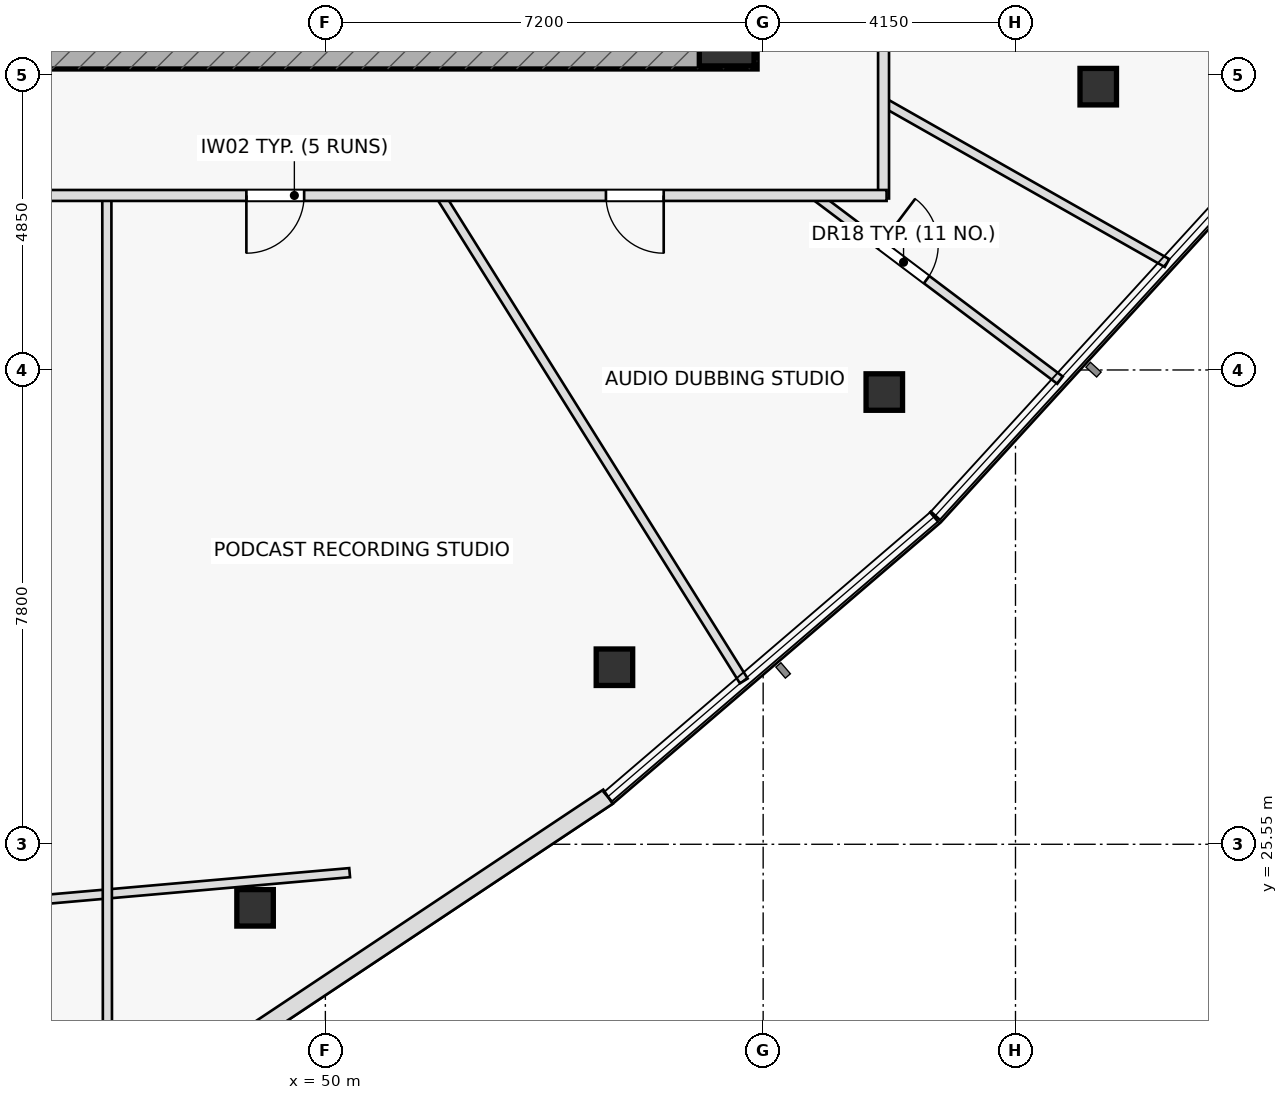
"""IFC4 building model, lengths in metres.
Left out: names, types, materials, properties, quantities, classifications, styles, units other than length and angle.
Written with IfcOpenShell. Run it as: python <this file> out.ifc"""

import sys

from ifc_helpers import new_model, si_unit, direction, frame, frame_2d, origin, origin_2d, place, context, subcontext, project, spatial, rectangle, hollow_rectangle, extrude, element, fill, save


model = new_model("IFC4")
c1 = context("Model", 3, precision=1e-05, world=origin(), true_north=direction((0.0, 1.0)))
c2 = subcontext(c1, "Body", "Model", "MODEL_VIEW")
j1 = project(units=[si_unit("LENGTHUNIT", "METRE"), si_unit("PLANEANGLEUNIT", "RADIAN")], contexts=[c1])
p1 = place(None, origin())
s1 = spatial("IfcSite", under=j1, at=p1, CompositionType="ELEMENT")
p2 = place(p1, origin())
s2 = spatial("IfcBuilding", under=s1, at=p2, CompositionType="ELEMENT")
p3 = place(p2, frame((0.0, 0.0, 226.1)))
s3 = spatial("IfcBuildingStorey", under=s2, at=p3, CompositionType="ELEMENT", Elevation=226.1)
p4 = place(p3, frame((42.9, 38.55, 0.0), z_axis=(0.0, 0.0, 1.0), x_axis=(1.0, 0.0, 0.0)))
e1 = element("IfcWall", 1, at=p4, inside=s3, PredefinedType="SHEAR", context=c2, shape_type="SweptSolid", body=[
    extrude(rectangle(XDim=14.2, YDim=0.5, at=frame_2d((7.1, 0.0))), origin(), (0.0, 0.0, 1.0), 3.65),
])
p5 = place(p4, frame((0.78, 0.0, 0.0)))
e2 = element("IfcOpeningElement", 2, at=p5, cuts=e1, PredefinedType="OPENING", context=c2, shape_type="SweptSolid", body=[
    extrude(rectangle(XDim=1.05, YDim=2.2, at=frame_2d((0.525, 1.1))), frame((0.0, 0.26, 0.0), z_axis=(0.0, -1.0, 0.0), x_axis=(1.0, 0.0, 0.0)), (0.0, 0.0, 1.0), 0.52),
])
p6 = place(p3, frame((56.6, 38.8, 0.0), z_axis=(0.0, 0.0, 1.0), x_axis=(1.0, 0.0, 0.0)))
e3 = element("IfcColumn", 3, at=p6, inside=s3, PredefinedType="COLUMN", context=c2, shape_type="SweptSolid", body=[
    extrude(rectangle(XDim=0.9, YDim=0.9, at=origin_2d()), origin(), (0.0, 0.0, 1.0), 3.65),
])
for number, where, z_axis, x_axis in (
    (4, (48.844, 24.505, 0.0), (0.0, 0.0, 1.0), (1.0, 0.0, 0.0)),
    (5, (54.754, 28.462, 0.0), (0.0, 0.0, 1.0), (1.0, 0.0, 0.0)),
    (6, (59.192, 32.987, 0.0), (0.0, 0.0, 1.0), (1.0, 0.0, 0.0)),
    (7, (62.711, 38.009, 0.0), (0.0, 0.0, 1.0), (1.0, 0.0, 0.0)),
):
    element("IfcColumn", number, at=place(p3, frame(where, z_axis=z_axis, x_axis=x_axis)), inside=s3, PredefinedType="COLUMN", context=c2, shape_type="SweptSolid", body=[
        extrude(hollow_rectangle(XDim=0.6, YDim=0.6, WallThickness=0.036, at=origin_2d()), origin(), (0.0, 0.0, 1.0), 3.65),
    ])
p7 = place(p3, frame((39.808, 24.152, 0.0), z_axis=(0.0, 0.0, 1.0), x_axis=(0.996153584085, 0.087624408208, 0.0)))
e8 = element("IfcWall", 8, at=p7, inside=s3, PredefinedType="PARTITIONING", context=c2, shape_type="SweptSolid", body=[
    extrude(rectangle(XDim=10.632, YDim=0.15, at=frame_2d((5.316, 0.0))), origin(), (0.0, 0.0, 1.0), 3.135),
])
p8 = place(p3, frame((58.052, 36.22, 0.0), z_axis=(0.0, 0.0, 1.0), x_axis=(0.79862211322, -0.601832800931, 0.0)))
e9 = element("IfcWall", 9, at=p8, inside=s3, PredefinedType="PARTITIONING", context=c2, shape_type="SweptSolid", body=[
    extrude(rectangle(XDim=5.047, YDim=0.15, at=frame_2d((2.523, 0.0))), origin(), (0.0, 0.0, 1.0), 3.135),
])
p9 = place(p8, frame((1.35, 0.0, 0.0)))
e10 = element("IfcOpeningElement", 10, at=p9, cuts=e9, PredefinedType="OPENING", context=c2, shape_type="SweptSolid", body=[
    extrude(rectangle(XDim=0.95, YDim=2.05, at=frame_2d((0.475, 1.025))), frame((0.0, 0.085, 0.0), z_axis=(0.0, -1.0, 0.0), x_axis=(1.0, 0.0, 0.0)), (0.0, 0.0, 1.0), 0.17),
])
p10 = place(p3, frame((59.18, 37.752, 0.0), z_axis=(0.0, 0.0, 1.0), x_axis=(0.869856049735, -0.49330563826, 0.0)))
e11 = element("IfcWall", 11, at=p10, inside=s3, PredefinedType="PARTITIONING", context=c2, shape_type="SweptSolid", body=[
    extrude(rectangle(XDim=5.359, YDim=0.15, at=frame_2d((2.68, 0.0))), origin(), (0.0, 0.0, 1.0), 3.135),
])
p11 = place(p3, frame((46.406, 36.22, 0.0), z_axis=(0.0, 0.0, 1.0), x_axis=(0.000683437859, -0.999999766456, 0.0)))
e12 = element("IfcWall", 12, at=p11, inside=s3, PredefinedType="PARTITIONING", context=c2, shape_type="SweptSolid", body=[
    extrude(rectangle(XDim=15.003, YDim=0.15, at=frame_2d((7.502, 0.0))), origin(), (0.0, 0.0, 1.0), 3.025),
])
p12 = place(p3, frame((51.89, 36.22, 0.0), z_axis=(0.0, 0.0, 1.0), x_axis=(0.530134111067, -0.847913807107, 0.0)))
e13 = element("IfcWall", 13, at=p12, inside=s3, PredefinedType="PARTITIONING", context=c2, shape_type="SweptSolid", body=[
    extrude(rectangle(XDim=9.416, YDim=0.15, at=frame_2d((4.708, 0.0))), origin(), (0.0, 0.0, 1.0), 3.025),
])
p13 = place(p3, frame((59.18, 41.1, 0.0), z_axis=(0.0, 0.0, 1.0), x_axis=(0.0, -1.0, 0.0)))
e14 = element("IfcWall", 14, at=p13, inside=s3, PredefinedType="PARTITIONING", context=c2, shape_type="SweptSolid", body=[
    extrude(rectangle(XDim=4.93, YDim=0.18, at=frame_2d((2.465, 0.0))), origin(), (0.0, 0.0, 1.0), 3.325),
])
p14 = place(p13, frame((1.342, 0.0, 0.0)))
e15 = element("IfcOpeningElement", 15, at=p14, cuts=e14, PredefinedType="OPENING", context=c2, shape_type="SweptSolid", body=[
    extrude(rectangle(XDim=0.95, YDim=2.05, at=frame_2d((0.475, 1.025))), frame((0.0, 0.1, 0.0), z_axis=(0.0, -1.0, 0.0), x_axis=(1.0, 0.0, 0.0)), (0.0, 0.0, 1.0), 0.2),
])
p15 = place(p3, frame((59.23, 36.22, 0.0), z_axis=(0.0, 0.0, 1.0), x_axis=(-1.0, 0.0, 0.0)))
e16 = element("IfcWall", 16, at=p15, inside=s3, PredefinedType="PARTITIONING", context=c2, shape_type="SweptSolid", body=[
    extrude(rectangle(XDim=19.48, YDim=0.18, at=frame_2d((9.74, 0.0))), origin(), (0.0, 0.0, 1.0), 3.025),
])
p16 = place(p15, frame((3.666, 0.0, 0.0)))
e17 = element("IfcOpeningElement", 17, at=p16, cuts=e16, PredefinedType="OPENING", context=c2, shape_type="SweptSolid", body=[
    extrude(rectangle(XDim=0.95, YDim=2.05, at=frame_2d((0.475, 1.025))), frame((0.0, 0.1, 0.0), z_axis=(0.0, -1.0, 0.0), x_axis=(1.0, 0.0, 0.0)), (0.0, 0.0, 1.0), 0.2),
])
p17 = place(p15, frame((9.579, 0.0, 0.0)))
e18 = element("IfcOpeningElement", 18, at=p17, cuts=e16, PredefinedType="OPENING", context=c2, shape_type="SweptSolid", body=[
    extrude(rectangle(XDim=0.95, YDim=2.05, at=frame_2d((0.475, 1.025))), frame((0.0, 0.1, 0.0), z_axis=(0.0, -1.0, 0.0), x_axis=(1.0, 0.0, 0.0)), (0.0, 0.0, 1.0), 0.2),
])
p18 = place(p15, frame((14.762, 0.0, 0.0)))
e19 = element("IfcOpeningElement", 19, at=p18, cuts=e16, PredefinedType="OPENING", context=c2, shape_type="SweptSolid", body=[
    extrude(rectangle(XDim=0.95, YDim=2.05, at=frame_2d((0.475, 1.025))), frame((0.0, 0.1, 0.0), z_axis=(0.0, -1.0, 0.0), x_axis=(1.0, 0.0, 0.0)), (0.0, 0.0, 1.0), 0.2),
])
p19 = place(p3, frame((48.736, 22.394, 0.0), z_axis=(0.0, 0.0, 1.0), x_axis=(0.832187740949, 0.554493970945, 0.0)))
e20 = element("IfcWall", 20, at=p19, inside=s3, PredefinedType="STANDARD", context=c2, shape_type="SweptSolid", body=[
    extrude(rectangle(XDim=7.104, YDim=0.28, at=frame_2d((3.552, 0.0))), origin(), (0.0, 0.0, 1.0), 3.65),
])
p20 = place(p9, origin())
e21 = element("IfcDoor", 21, at=p20, inside=s3, OperationType="SINGLE_SWING_LEFT", PredefinedType="DOOR", context=c2, shape_type="SweptSolid", body=[
    extrude(rectangle(XDim=0.95, YDim=2.05, at=frame_2d((0.475, 1.025))), frame((0.0, 0.025, 0.0), z_axis=(0.0, -1.0, 0.0), x_axis=(1.0, 0.0, 0.0)), (0.0, 0.0, 1.0), 0.05),
])
fill(e10, e21)
p21 = place(p16, origin())
e22 = element("IfcDoor", 22, at=p21, inside=s3, OperationType="SINGLE_SWING_LEFT", PredefinedType="DOOR", context=c2, shape_type="SweptSolid", body=[
    extrude(rectangle(XDim=0.95, YDim=2.05, at=frame_2d((0.475, 1.025))), frame((0.0, 0.025, 0.0), z_axis=(0.0, -1.0, 0.0), x_axis=(1.0, 0.0, 0.0)), (0.0, 0.0, 1.0), 0.05),
])
fill(e17, e22)
p22 = place(p17, origin())
e23 = element("IfcDoor", 23, at=p22, inside=s3, OperationType="SINGLE_SWING_RIGHT", PredefinedType="DOOR", context=c2, shape_type="SweptSolid", body=[
    extrude(rectangle(XDim=0.95, YDim=2.05, at=frame_2d((0.475, 1.025))), frame((0.0, 0.025, 0.0), z_axis=(0.0, -1.0, 0.0), x_axis=(1.0, 0.0, 0.0)), (0.0, 0.0, 1.0), 0.05),
])
fill(e18, e23)
save(model, sys.argv[1])
